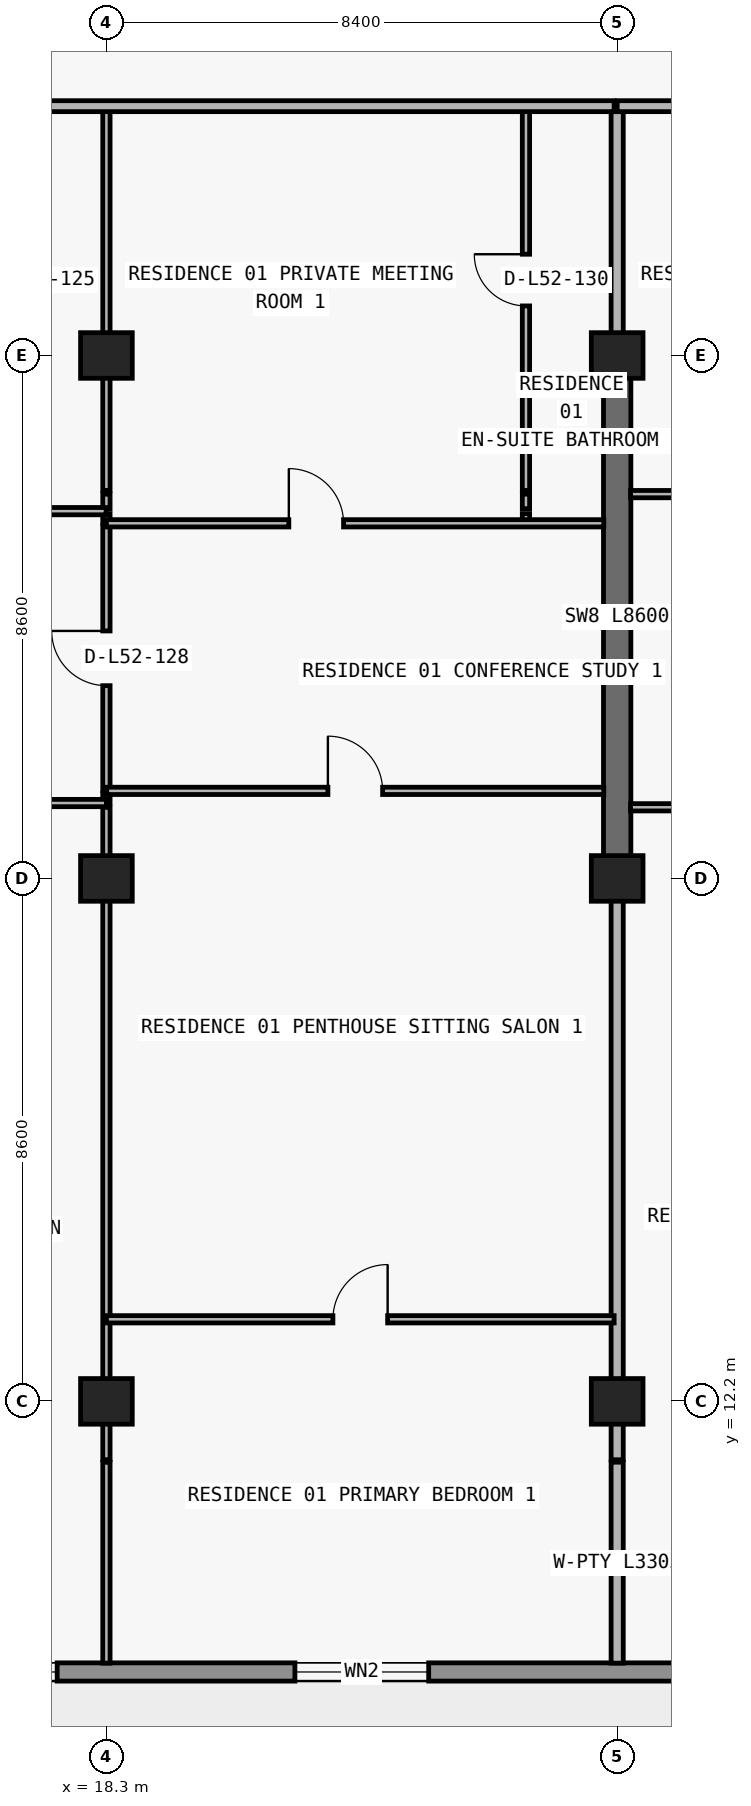
"""IFC4 building model, lengths in metres.
Left out: names, types, materials, properties, quantities, classifications, styles, units other than length and angle.
Written with IfcOpenShell. Run it as: python <this file> out.ifc"""

import sys

from ifc_helpers import new_model, si_unit, direction, frame, frame_2d, origin, origin_2d, place, context, subcontext, project, spatial, rectangle, extrude, element, fill, save


model = new_model("IFC4")
c1 = context("Model", 3, precision=1e-05, world=origin(), true_north=direction((0.0, 1.0)))
c2 = subcontext(c1, "Body", "Model", "MODEL_VIEW")
j1 = project(units=[si_unit("LENGTHUNIT", "METRE"), si_unit("PLANEANGLEUNIT", "RADIAN")], contexts=[c1])
p1 = place(None, origin())
s1 = spatial("IfcSite", under=j1, at=p1, CompositionType="ELEMENT")
p2 = place(p1, origin())
s2 = spatial("IfcBuilding", under=s1, at=p2, CompositionType="ELEMENT")
p3 = place(p2, frame((0.0, 0.0, 188.4)))
s3 = spatial("IfcBuildingStorey", under=s2, at=p3, CompositionType="ELEMENT", Elevation=188.4)
for number, where, z_axis, x_axis in (
    (1, (18.3, 12.2, 0.0), (0.0, 0.0, 1.0), (1.0, 0.0, 0.0)),
    (2, (26.7, 12.2, 0.0), (0.0, 0.0, 1.0), (1.0, 0.0, 0.0)),
    (3, (18.3, 20.8, 0.0), (0.0, 0.0, 1.0), (1.0, 0.0, 0.0)),
    (4, (26.7, 20.8, 0.0), (0.0, 0.0, 1.0), (1.0, 0.0, 0.0)),
    (5, (18.3, 29.4, 0.0), (0.0, 0.0, 1.0), (1.0, 0.0, 0.0)),
    (6, (26.7, 29.4, 0.0), (0.0, 0.0, 1.0), (1.0, 0.0, 0.0)),
):
    element("IfcColumn", number, at=place(p3, frame(where, z_axis=z_axis, x_axis=x_axis)), inside=s3, PredefinedType="COLUMN", context=c2, shape_type="SweptSolid", body=[
        extrude(rectangle(XDim=0.85, YDim=0.75, at=origin_2d()), origin(), (0.0, 0.0, 1.0), 3.05),
    ])
p4 = place(p3, frame((26.7, 20.8, 0.0), z_axis=(0.0, 0.0, 1.0), x_axis=(0.0, 1.0, 0.0)))
e7 = element("IfcWall", 7, at=p4, inside=s3, PredefinedType="SHEAR", context=c2, shape_type="SweptSolid", body=[
    extrude(rectangle(XDim=8.6, YDim=0.45, at=frame_2d((4.3, 0.0))), origin(), (0.0, 0.0, 1.0), 3.05),
])
p5 = place(p3, frame((67.7, 7.75, 0.0), z_axis=(0.0, 0.0, 1.0), x_axis=(-1.0, 0.0, 0.0)))
e8 = element("IfcWall", 8, at=p5, inside=s3, PredefinedType="STANDARD", context=c2, shape_type="SweptSolid", body=[
    extrude(rectangle(XDim=57.6, YDim=0.3, at=frame_2d((28.8, 0.0))), origin(), (0.0, 0.0, 1.0), 3.05),
])
p6 = place(p5, frame((54.69, 0.0, 0.0)))
e9 = element("IfcOpeningElement", 9, at=p6, cuts=e8, PredefinedType="OPENING", context=c2, shape_type="SweptSolid", body=[
    extrude(rectangle(XDim=2.0, YDim=2.3, at=frame_2d((1.0, 1.15))), frame((0.0, 0.16, 0.0), z_axis=(0.0, -1.0, 0.0), x_axis=(1.0, 0.0, 0.0)), (0.0, 0.0, 1.0), 0.32),
])
p7 = place(p5, frame((50.21, 0.0, 0.65)))
e10 = element("IfcOpeningElement", 10, at=p7, cuts=e8, PredefinedType="OPENING", context=c2, shape_type="SweptSolid", body=[
    extrude(rectangle(XDim=2.6, YDim=1.85, at=frame_2d((1.3, 0.925))), frame((0.0, 0.16, 0.0), z_axis=(0.0, -1.0, 0.0), x_axis=(1.0, 0.0, 0.0)), (0.0, 0.0, 1.0), 0.32),
])
p8 = place(p5, frame((44.1, 0.0, 0.85)))
e11 = element("IfcOpeningElement", 11, at=p8, cuts=e8, PredefinedType="OPENING", context=c2, shape_type="SweptSolid", body=[
    extrude(rectangle(XDim=2.2, YDim=1.55, at=frame_2d((1.1, 0.775))), frame((0.0, 0.16, 0.0), z_axis=(0.0, -1.0, 0.0), x_axis=(1.0, 0.0, 0.0)), (0.0, 0.0, 1.0), 0.32),
])
p9 = place(p5, frame((37.69, 0.0, 0.0)))
e12 = element("IfcOpeningElement", 12, at=p9, cuts=e8, PredefinedType="OPENING", context=c2, shape_type="SweptSolid", body=[
    extrude(rectangle(XDim=2.0, YDim=2.3, at=frame_2d((1.0, 1.15))), frame((0.0, 0.16, 0.0), z_axis=(0.0, -1.0, 0.0), x_axis=(1.0, 0.0, 0.0)), (0.0, 0.0, 1.0), 0.32),
])
p10 = place(p5, frame((33.59, 0.0, 0.85)))
e13 = element("IfcOpeningElement", 13, at=p10, cuts=e8, PredefinedType="OPENING", context=c2, shape_type="SweptSolid", body=[
    extrude(rectangle(XDim=1.8, YDim=1.55, at=frame_2d((0.9, 0.775))), frame((0.0, 0.16, 0.0), z_axis=(0.0, -1.0, 0.0), x_axis=(1.0, 0.0, 0.0)), (0.0, 0.0, 1.0), 0.32),
])
p11 = place(p5, frame((29.69, 0.0, 0.0)))
e14 = element("IfcOpeningElement", 14, at=p11, cuts=e8, PredefinedType="OPENING", context=c2, shape_type="SweptSolid", body=[
    extrude(rectangle(XDim=2.0, YDim=2.3, at=frame_2d((1.0, 1.15))), frame((0.0, 0.16, 0.0), z_axis=(0.0, -1.0, 0.0), x_axis=(1.0, 0.0, 0.0)), (0.0, 0.0, 1.0), 0.32),
])
p12 = place(p5, frame((25.81, 0.0, 0.65)))
e15 = element("IfcOpeningElement", 15, at=p12, cuts=e8, PredefinedType="OPENING", context=c2, shape_type="SweptSolid", body=[
    extrude(rectangle(XDim=2.6, YDim=1.85, at=frame_2d((1.3, 0.925))), frame((0.0, 0.16, 0.0), z_axis=(0.0, -1.0, 0.0), x_axis=(1.0, 0.0, 0.0)), (0.0, 0.0, 1.0), 0.32),
])
p13 = place(p5, frame((19.7, 0.0, 0.85)))
e16 = element("IfcOpeningElement", 16, at=p13, cuts=e8, PredefinedType="OPENING", context=c2, shape_type="SweptSolid", body=[
    extrude(rectangle(XDim=2.2, YDim=1.55, at=frame_2d((1.1, 0.775))), frame((0.0, 0.16, 0.0), z_axis=(0.0, -1.0, 0.0), x_axis=(1.0, 0.0, 0.0)), (0.0, 0.0, 1.0), 0.32),
])
p14 = place(p5, frame((13.29, 0.0, 0.0)))
e17 = element("IfcOpeningElement", 17, at=p14, cuts=e8, PredefinedType="OPENING", context=c2, shape_type="SweptSolid", body=[
    extrude(rectangle(XDim=2.0, YDim=2.3, at=frame_2d((1.0, 1.15))), frame((0.0, 0.16, 0.0), z_axis=(0.0, -1.0, 0.0), x_axis=(1.0, 0.0, 0.0)), (0.0, 0.0, 1.0), 0.32),
])
p15 = place(p5, frame((9.19, 0.0, 0.85)))
e18 = element("IfcOpeningElement", 18, at=p15, cuts=e8, PredefinedType="OPENING", context=c2, shape_type="SweptSolid", body=[
    extrude(rectangle(XDim=1.8, YDim=1.55, at=frame_2d((0.9, 0.775))), frame((0.0, 0.16, 0.0), z_axis=(0.0, -1.0, 0.0), x_axis=(1.0, 0.0, 0.0)), (0.0, 0.0, 1.0), 0.32),
])
p16 = place(p5, frame((5.273, 0.0, 0.0)))
e19 = element("IfcOpeningElement", 19, at=p16, cuts=e8, PredefinedType="OPENING", context=c2, shape_type="SweptSolid", body=[
    extrude(rectangle(XDim=2.0, YDim=2.3, at=frame_2d((1.0, 1.15))), frame((0.0, 0.16, 0.0), z_axis=(0.0, -1.0, 0.0), x_axis=(1.0, 0.0, 0.0)), (0.0, 0.0, 1.0), 0.32),
])
p17 = place(p5, frame((1.073, 0.0, 0.85)))
e20 = element("IfcOpeningElement", 20, at=p17, cuts=e8, PredefinedType="OPENING", context=c2, shape_type="SweptSolid", body=[
    extrude(rectangle(XDim=2.2, YDim=1.55, at=frame_2d((1.1, 0.775))), frame((0.0, 0.16, 0.0), z_axis=(0.0, -1.0, 0.0), x_axis=(1.0, 0.0, 0.0)), (0.0, 0.0, 1.0), 0.32),
])
p18 = place(p3, frame((18.3, 7.895, 0.0), z_axis=(0.0, 0.0, 1.0), x_axis=(0.0, 1.0, 0.0)))
e21 = element("IfcWall", 21, at=p18, inside=s3, PredefinedType="PARTITIONING", context=c2, shape_type="SweptSolid", body=[
    extrude(rectangle(XDim=3.305, YDim=0.12, at=frame_2d((1.652, 0.0))), origin(), (0.0, 0.0, 1.0), 3.05),
])
p19 = place(p3, frame((18.3, 11.24, 0.0), z_axis=(0.0, 0.0, 1.0), x_axis=(0.0, 1.0, 0.0)))
e22 = element("IfcWall", 22, at=p19, inside=s3, PredefinedType="PARTITIONING", context=c2, shape_type="SweptSolid", body=[
    extrude(rectangle(XDim=10.73, YDim=0.12, at=frame_2d((5.365, 0.0))), origin(), (0.0, 0.0, 1.0), 2.263),
])
p20 = place(p3, frame((18.3, 22.04, 0.0), z_axis=(0.0, 0.0, 1.0), x_axis=(0.0, 1.0, 0.0)))
e23 = element("IfcWall", 23, at=p20, inside=s3, PredefinedType="PARTITIONING", context=c2, shape_type="SweptSolid", body=[
    extrude(rectangle(XDim=0.16, YDim=0.12, at=frame_2d((0.08, 0.0))), origin(), (0.0, 0.0, 1.0), 2.263),
])
p21 = place(p3, frame((18.3, 22.24, 0.0), z_axis=(0.0, 0.0, 1.0), x_axis=(0.0, 1.0, 0.0)))
e24 = element("IfcWall", 24, at=p21, inside=s3, PredefinedType="PARTITIONING", context=c2, shape_type="SweptSolid", body=[
    extrude(rectangle(XDim=4.36, YDim=0.12, at=frame_2d((2.18, 0.0))), origin(), (0.0, 0.0, 1.0), 2.263),
])
p22 = place(p21, frame((1.73, 0.0, 0.0)))
e25 = element("IfcOpeningElement", 25, at=p22, cuts=e24, PredefinedType="OPENING", context=c2, shape_type="SweptSolid", body=[
    extrude(rectangle(XDim=0.9, YDim=2.15, at=frame_2d((0.45, 1.075))), frame((0.0, 0.07, 0.0), z_axis=(0.0, -1.0, 0.0), x_axis=(1.0, 0.0, 0.0)), (0.0, 0.0, 1.0), 0.14),
])
p23 = place(p3, frame((18.3, 26.64, 0.0), z_axis=(0.0, 0.0, 1.0), x_axis=(0.0, 1.0, 0.0)))
e26 = element("IfcWall", 26, at=p23, inside=s3, PredefinedType="PARTITIONING", context=c2, shape_type="SweptSolid", body=[
    extrude(rectangle(XDim=0.16, YDim=0.12, at=frame_2d((0.08, 0.0))), origin(), (0.0, 0.0, 1.0), 2.263),
])
p24 = place(p3, frame((18.3, 26.88, 0.0), z_axis=(0.0, 0.0, 1.0), x_axis=(0.0, 1.0, 0.0)))
e27 = element("IfcWall", 27, at=p24, inside=s3, PredefinedType="PARTITIONING", context=c2, shape_type="SweptSolid", body=[
    extrude(rectangle(XDim=0.24, YDim=0.12, at=frame_2d((0.12, 0.0))), origin(), (0.0, 0.0, 1.0), 2.263),
])
p25 = place(p3, frame((18.3, 27.18, 0.0), z_axis=(0.0, 0.0, 1.0), x_axis=(0.0, 1.0, 0.0)))
e28 = element("IfcWall", 28, at=p25, inside=s3, PredefinedType="PARTITIONING", context=c2, shape_type="SweptSolid", body=[
    extrude(rectangle(XDim=6.32, YDim=0.12, at=frame_2d((3.16, 0.0))), origin(), (0.0, 0.0, 1.0), 2.263),
])
p26 = place(p3, frame((25.2, 26.64, 0.0), z_axis=(0.0, 0.0, 1.0), x_axis=(0.0, 1.0, 0.0)))
e29 = element("IfcWall", 29, at=p26, inside=s3, PredefinedType="PARTITIONING", context=c2, shape_type="SweptSolid", body=[
    extrude(rectangle(XDim=0.16, YDim=0.12, at=frame_2d((0.08, 0.0))), origin(), (0.0, 0.0, 1.0), 3.05),
])
p27 = place(p3, frame((25.2, 26.88, 0.0), z_axis=(0.0, 0.0, 1.0), x_axis=(0.0, 1.0, 0.0)))
e30 = element("IfcWall", 30, at=p27, inside=s3, PredefinedType="PARTITIONING", context=c2, shape_type="SweptSolid", body=[
    extrude(rectangle(XDim=0.24, YDim=0.12, at=frame_2d((0.12, 0.0))), origin(), (0.0, 0.0, 1.0), 3.05),
])
p28 = place(p3, frame((25.2, 27.18, 0.0), z_axis=(0.0, 0.0, 1.0), x_axis=(0.0, 1.0, 0.0)))
e31 = element("IfcWall", 31, at=p28, inside=s3, PredefinedType="PARTITIONING", context=c2, shape_type="SweptSolid", body=[
    extrude(rectangle(XDim=6.32, YDim=0.12, at=frame_2d((3.16, 0.0))), origin(), (0.0, 0.0, 1.0), 3.05),
])
p29 = place(p28, frame((3.035, 0.0, 0.0)))
e32 = element("IfcOpeningElement", 32, at=p29, cuts=e31, PredefinedType="OPENING", context=c2, shape_type="SweptSolid", body=[
    extrude(rectangle(XDim=0.85, YDim=2.1, at=frame_2d((0.425, 1.05))), frame((0.0, 0.07, 0.0), z_axis=(0.0, -1.0, 0.0), x_axis=(1.0, 0.0, 0.0)), (0.0, 0.0, 1.0), 0.14),
])
p30 = place(p3, frame((26.7, 7.895, 0.0), z_axis=(0.0, 0.0, 1.0), x_axis=(0.0, 1.0, 0.0)))
e33 = element("IfcWall", 33, at=p30, inside=s3, PredefinedType="PARTITIONING", context=c2, shape_type="SweptSolid", body=[
    extrude(rectangle(XDim=3.305, YDim=0.2, at=frame_2d((1.652, 0.0))), origin(), (0.0, 0.0, 1.0), 3.05),
])
p31 = place(p3, frame((26.7, 11.24, 0.0), z_axis=(0.0, 0.0, 1.0), x_axis=(0.0, 1.0, 0.0)))
e34 = element("IfcWall", 34, at=p31, inside=s3, PredefinedType="PARTITIONING", context=c2, shape_type="SweptSolid", body=[
    extrude(rectangle(XDim=9.555, YDim=0.2, at=frame_2d((4.777, 0.0))), origin(), (0.0, 0.0, 1.0), 2.263),
])
p32 = place(p3, frame((26.7, 29.405, 0.0), z_axis=(0.0, 0.0, 1.0), x_axis=(0.0, 1.0, 0.0)))
e35 = element("IfcWall", 35, at=p32, inside=s3, PredefinedType="PARTITIONING", context=c2, shape_type="SweptSolid", body=[
    extrude(rectangle(XDim=4.095, YDim=0.2, at=frame_2d((2.047, 0.0))), origin(), (0.0, 0.0, 1.0), 2.335),
])
p33 = place(p3, frame((18.3, 13.55, 0.0), z_axis=(0.0, 0.0, 1.0), x_axis=(1.0, 0.0, 0.0)))
e36 = element("IfcWall", 36, at=p33, inside=s3, PredefinedType="PARTITIONING", context=c2, shape_type="SweptSolid", body=[
    extrude(rectangle(XDim=8.35, YDim=0.12, at=frame_2d((4.175, 0.0))), origin(), (0.0, 0.0, 1.0), 3.05),
])
p34 = place(p33, frame((3.725, 0.0, 0.0)))
e37 = element("IfcOpeningElement", 37, at=p34, cuts=e36, PredefinedType="OPENING", context=c2, shape_type="SweptSolid", body=[
    extrude(rectangle(XDim=0.9, YDim=2.15, at=frame_2d((0.45, 1.075))), frame((0.0, 0.07, 0.0), z_axis=(0.0, -1.0, 0.0), x_axis=(1.0, 0.0, 0.0)), (0.0, 0.0, 1.0), 0.14),
])
p35 = place(p3, frame((26.92, 21.97, 0.0), z_axis=(0.0, 0.0, 1.0), x_axis=(1.0, 0.0, 0.0)))
e38 = element("IfcWall", 38, at=p35, inside=s3, PredefinedType="PARTITIONING", context=c2, shape_type="SweptSolid", body=[
    extrude(rectangle(XDim=4.4, YDim=0.12, at=frame_2d((2.2, 0.0))), origin(), (0.0, 0.0, 1.0), 3.05),
])
p36 = place(p35, frame((1.75, 0.0, 0.0)))
e39 = element("IfcOpeningElement", 39, at=p36, cuts=e38, PredefinedType="OPENING", context=c2, shape_type="SweptSolid", body=[
    extrude(rectangle(XDim=0.9, YDim=2.15, at=frame_2d((0.45, 1.075))), frame((0.0, 0.07, 0.0), z_axis=(0.0, -1.0, 0.0), x_axis=(1.0, 0.0, 0.0)), (0.0, 0.0, 1.0), 0.14),
])
p37 = place(p3, frame((10.1, 22.04, 0.0), z_axis=(0.0, 0.0, 1.0), x_axis=(1.0, 0.0, 0.0)))
e40 = element("IfcWall", 40, at=p37, inside=s3, PredefinedType="PARTITIONING", context=c2, shape_type="SweptSolid", body=[
    extrude(rectangle(XDim=8.2, YDim=0.12, at=frame_2d((4.1, 0.0))), origin(), (0.0, 0.0, 1.0), 3.05),
])
p38 = place(p37, frame((3.65, 0.0, 0.0)))
e41 = element("IfcOpeningElement", 41, at=p38, cuts=e40, PredefinedType="OPENING", context=c2, shape_type="SweptSolid", body=[
    extrude(rectangle(XDim=0.9, YDim=2.15, at=frame_2d((0.45, 1.075))), frame((0.0, 0.07, 0.0), z_axis=(0.0, -1.0, 0.0), x_axis=(1.0, 0.0, 0.0)), (0.0, 0.0, 1.0), 0.14),
])
p39 = place(p3, frame((18.305, 22.24, 0.0), z_axis=(0.0, 0.0, 1.0), x_axis=(1.0, 0.0, 0.0)))
e42 = element("IfcWall", 42, at=p39, inside=s3, PredefinedType="PARTITIONING", context=c2, shape_type="SweptSolid", body=[
    extrude(rectangle(XDim=8.175, YDim=0.12, at=frame_2d((4.087, 0.0))), origin(), (0.0, 0.0, 1.0), 3.05),
])
p40 = place(p39, frame((3.637, 0.0, 0.0)))
e43 = element("IfcOpeningElement", 43, at=p40, cuts=e42, PredefinedType="OPENING", context=c2, shape_type="SweptSolid", body=[
    extrude(rectangle(XDim=0.9, YDim=2.15, at=frame_2d((0.45, 1.075))), frame((0.0, 0.07, 0.0), z_axis=(0.0, -1.0, 0.0), x_axis=(1.0, 0.0, 0.0)), (0.0, 0.0, 1.0), 0.14),
])
p41 = place(p3, frame((18.3, 26.64, 0.0), z_axis=(0.0, 0.0, 1.0), x_axis=(1.0, 0.0, 0.0)))
e44 = element("IfcWall", 44, at=p41, inside=s3, PredefinedType="PARTITIONING", context=c2, shape_type="SweptSolid", body=[
    extrude(rectangle(XDim=8.18, YDim=0.12, at=frame_2d((4.09, 0.0))), origin(), (0.0, 0.0, 1.0), 3.05),
])
p42 = place(p41, frame((3.0, 0.0, 0.0)))
e45 = element("IfcOpeningElement", 45, at=p42, cuts=e44, PredefinedType="OPENING", context=c2, shape_type="SweptSolid", body=[
    extrude(rectangle(XDim=0.9, YDim=2.15, at=frame_2d((0.45, 1.075))), frame((0.0, 0.07, 0.0), z_axis=(0.0, -1.0, 0.0), x_axis=(1.0, 0.0, 0.0)), (0.0, 0.0, 1.0), 0.14),
])
p43 = place(p3, frame((10.1, 26.84, 0.0), z_axis=(0.0, 0.0, 1.0), x_axis=(1.0, 0.0, 0.0)))
e46 = element("IfcWall", 46, at=p43, inside=s3, PredefinedType="PARTITIONING", context=c2, shape_type="SweptSolid", body=[
    extrude(rectangle(XDim=8.195, YDim=0.12, at=frame_2d((4.097, 0.0))), origin(), (0.0, 0.0, 1.0), 3.05),
])
p44 = place(p43, frame((2.876, 0.0, 0.0)))
e47 = element("IfcOpeningElement", 47, at=p44, cuts=e46, PredefinedType="OPENING", context=c2, shape_type="SweptSolid", body=[
    extrude(rectangle(XDim=0.9, YDim=2.15, at=frame_2d((0.45, 1.075))), frame((0.0, 0.07, 0.0), z_axis=(0.0, -1.0, 0.0), x_axis=(1.0, 0.0, 0.0)), (0.0, 0.0, 1.0), 0.14),
])
p45 = place(p3, frame((26.92, 27.12, 0.0), z_axis=(0.0, 0.0, 1.0), x_axis=(1.0, 0.0, 0.0)))
e48 = element("IfcWall", 48, at=p45, inside=s3, PredefinedType="PARTITIONING", context=c2, shape_type="SweptSolid", body=[
    extrude(rectangle(XDim=4.4, YDim=0.12, at=frame_2d((2.2, 0.0))), origin(), (0.0, 0.0, 1.0), 3.05),
])
p46 = place(p45, frame((1.75, 0.0, 0.0)))
e49 = element("IfcOpeningElement", 49, at=p46, cuts=e48, PredefinedType="OPENING", context=c2, shape_type="SweptSolid", body=[
    extrude(rectangle(XDim=0.9, YDim=2.15, at=frame_2d((0.45, 1.075))), frame((0.0, 0.07, 0.0), z_axis=(0.0, -1.0, 0.0), x_axis=(1.0, 0.0, 0.0)), (0.0, 0.0, 1.0), 0.14),
])
p47 = place(p3, frame((10.105, 33.5, 0.0), z_axis=(0.0, 0.0, 1.0), x_axis=(1.0, 0.0, 0.0)))
e50 = element("IfcWall", 50, at=p47, inside=s3, PredefinedType="PARTITIONING", context=c2, shape_type="SweptSolid", body=[
    extrude(rectangle(XDim=16.545, YDim=0.18, at=frame_2d((8.272, 0.0))), origin(), (0.0, 0.0, 1.0), 3.05),
])
p48 = place(p47, frame((2.824, 0.0, 0.0)))
e51 = element("IfcOpeningElement", 51, at=p48, cuts=e50, PredefinedType="OPENING", context=c2, shape_type="SweptSolid", body=[
    extrude(rectangle(XDim=1.0, YDim=2.2, at=frame_2d((0.5, 1.1))), frame((0.0, 0.1, 0.0), z_axis=(0.0, -1.0, 0.0), x_axis=(1.0, 0.0, 0.0)), (0.0, 0.0, 1.0), 0.2),
])
p49 = place(p3, frame((26.7, 33.5, 0.0), z_axis=(0.0, 0.0, 1.0), x_axis=(1.0, 0.0, 0.0)))
e52 = element("IfcWall", 52, at=p49, inside=s3, PredefinedType="PARTITIONING", context=c2, shape_type="SweptSolid", body=[
    extrude(rectangle(XDim=4.62, YDim=0.18, at=frame_2d((2.31, 0.0))), origin(), (0.0, 0.0, 1.0), 3.05),
])
p50 = place(p49, frame((1.81, 0.0, 0.0)))
e53 = element("IfcOpeningElement", 53, at=p50, cuts=e52, PredefinedType="OPENING", context=c2, shape_type="SweptSolid", body=[
    extrude(rectangle(XDim=1.0, YDim=2.2, at=frame_2d((0.5, 1.1))), frame((0.0, 0.1, 0.0), z_axis=(0.0, -1.0, 0.0), x_axis=(1.0, 0.0, 0.0)), (0.0, 0.0, 1.0), 0.2),
])
p51 = place(p7, origin())
e54 = element("IfcWindow", 54, at=p51, inside=s3, PartitioningType="SINGLE_PANEL", PredefinedType="WINDOW", context=c2, shape_type="SweptSolid", body=[
    extrude(rectangle(XDim=2.6, YDim=1.85, at=frame_2d((1.3, 0.925))), frame((0.0, 0.03, 0.0), z_axis=(0.0, -1.0, 0.0), x_axis=(1.0, 0.0, 0.0)), (0.0, 0.0, 1.0), 0.06),
])
fill(e10, e54)
p52 = place(p8, origin())
e55 = element("IfcWindow", 55, at=p52, inside=s3, PartitioningType="SINGLE_PANEL", PredefinedType="WINDOW", context=c2, shape_type="SweptSolid", body=[
    extrude(rectangle(XDim=2.2, YDim=1.55, at=frame_2d((1.1, 0.775))), frame((0.0, 0.03, 0.0), z_axis=(0.0, -1.0, 0.0), x_axis=(1.0, 0.0, 0.0)), (0.0, 0.0, 1.0), 0.06),
])
fill(e11, e55)
p53 = place(p22, origin())
e56 = element("IfcDoor", 56, at=p53, inside=s3, OperationType="SINGLE_SWING_RIGHT", PredefinedType="DOOR", context=c2, shape_type="SweptSolid", body=[
    extrude(rectangle(XDim=0.9, YDim=2.15, at=frame_2d((0.45, 1.075))), frame((0.0, 0.025, 0.0), z_axis=(0.0, -1.0, 0.0), x_axis=(1.0, 0.0, 0.0)), (0.0, 0.0, 1.0), 0.05),
])
fill(e25, e56)
p54 = place(p42, origin())
e57 = element("IfcDoor", 57, at=p54, inside=s3, OperationType="SINGLE_SWING_LEFT", PredefinedType="DOOR", context=c2, shape_type="SweptSolid", body=[
    extrude(rectangle(XDim=0.9, YDim=2.15, at=frame_2d((0.45, 1.075))), frame((0.0, 0.025, 0.0), z_axis=(0.0, -1.0, 0.0), x_axis=(1.0, 0.0, 0.0)), (0.0, 0.0, 1.0), 0.05),
])
fill(e45, e57)
p55 = place(p29, origin())
e58 = element("IfcDoor", 58, at=p55, inside=s3, OperationType="SINGLE_SWING_RIGHT", PredefinedType="DOOR", context=c2, shape_type="SweptSolid", body=[
    extrude(rectangle(XDim=0.85, YDim=2.1, at=frame_2d((0.425, 1.05))), frame((0.0, 0.025, 0.0), z_axis=(0.0, -1.0, 0.0), x_axis=(1.0, 0.0, 0.0)), (0.0, 0.0, 1.0), 0.05),
])
fill(e32, e58)
p56 = place(p40, origin())
e59 = element("IfcDoor", 59, at=p56, inside=s3, OperationType="SINGLE_SWING_LEFT", PredefinedType="DOOR", context=c2, shape_type="SweptSolid", body=[
    extrude(rectangle(XDim=0.9, YDim=2.15, at=frame_2d((0.45, 1.075))), frame((0.0, 0.025, 0.0), z_axis=(0.0, -1.0, 0.0), x_axis=(1.0, 0.0, 0.0)), (0.0, 0.0, 1.0), 0.05),
])
fill(e43, e59)
p57 = place(p34, origin())
e60 = element("IfcDoor", 60, at=p57, inside=s3, OperationType="SINGLE_SWING_RIGHT", PredefinedType="DOOR", context=c2, shape_type="SweptSolid", body=[
    extrude(rectangle(XDim=0.9, YDim=2.15, at=frame_2d((0.45, 1.075))), frame((0.0, 0.025, 0.0), z_axis=(0.0, -1.0, 0.0), x_axis=(1.0, 0.0, 0.0)), (0.0, 0.0, 1.0), 0.05),
])
fill(e37, e60)
save(model, sys.argv[1])
